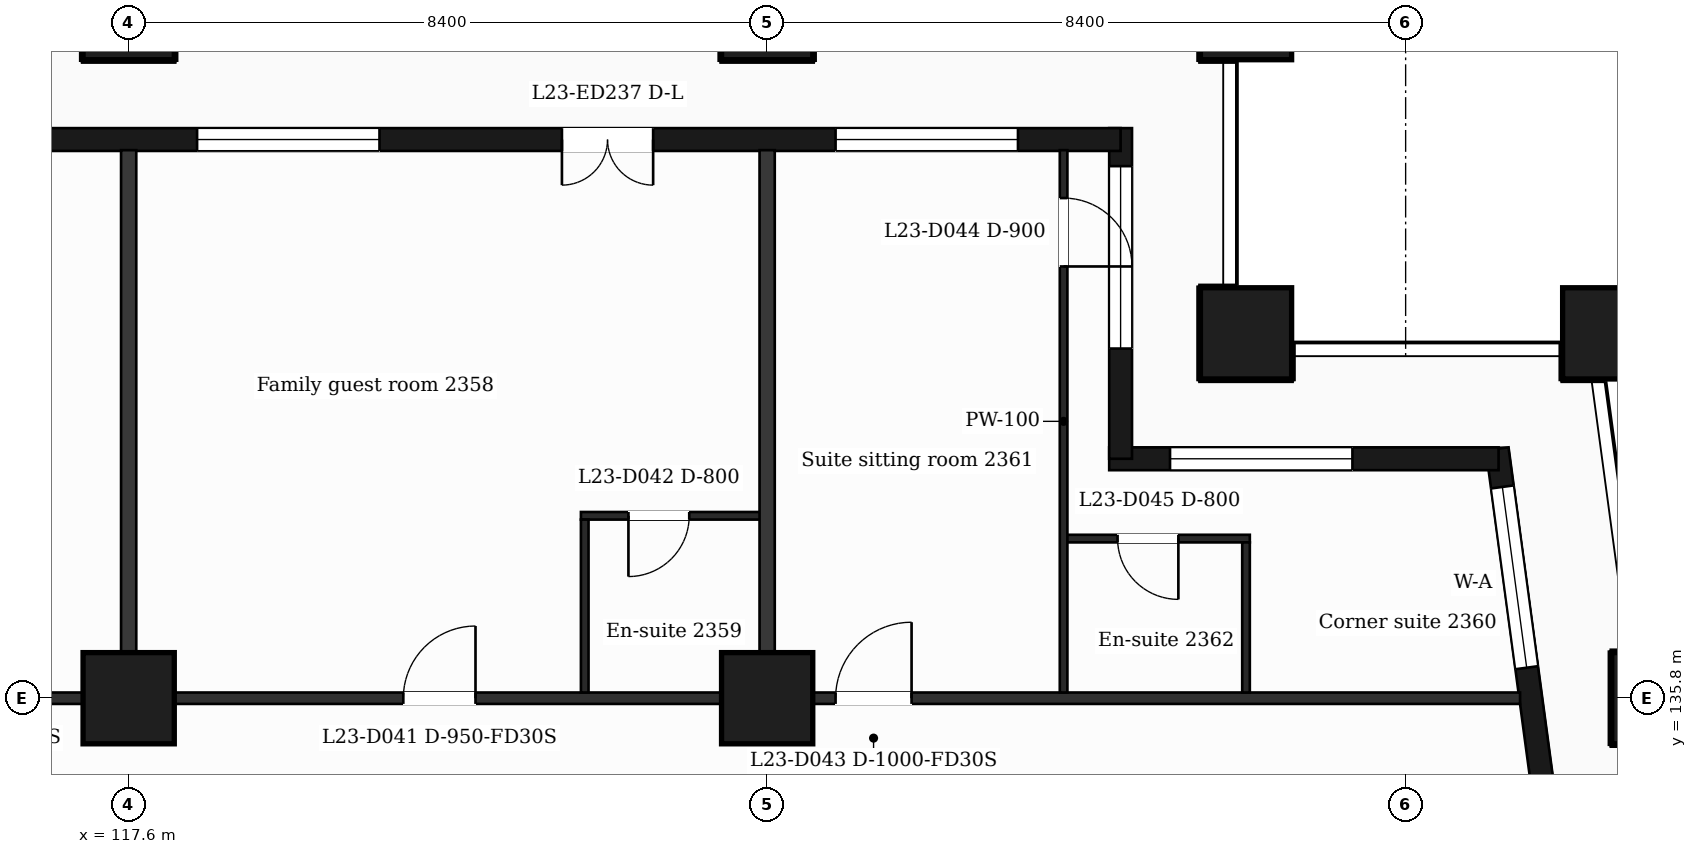
"""IFC4 building model, lengths in metres.
Left out: names, types, materials, properties, quantities, classifications, styles, units other than length and angle.
Written with IfcOpenShell. Run it as: python <this file> out.ifc"""

import sys

from ifc_helpers import new_model, si_unit, direction, frame, frame_2d, origin, origin_2d, place, context, subcontext, project, spatial, rectangle, extrude, element, fill, save


model = new_model("IFC4")
c1 = context("Model", 3, precision=1e-05, world=origin(), true_north=direction((0.0, 1.0)))
c2 = subcontext(c1, "Body", "Model", "MODEL_VIEW")
j1 = project(units=[si_unit("LENGTHUNIT", "METRE"), si_unit("PLANEANGLEUNIT", "RADIAN")], contexts=[c1])
p1 = place(None, origin())
s1 = spatial("IfcSite", under=j1, at=p1, CompositionType="ELEMENT")
p2 = place(p1, origin())
s2 = spatial("IfcBuilding", under=s1, at=p2, CompositionType="ELEMENT")
p3 = place(p2, frame((0.0, 0.0, 102.1)))
s3 = spatial("IfcBuildingStorey", under=s2, at=p3, CompositionType="ELEMENT", Elevation=102.1)
for number, where, z_axis, x_axis in (
    (1, (132.3, 140.6, 0.0), (0.0, 0.0, 1.0), (1.0, 0.0, 0.0)),
    (2, (137.065, 140.6, 0.0), (0.0, 0.0, 1.0), (1.0, 0.0, 0.0)),
    (3, (117.6, 135.8, 0.0), (0.0, 0.0, 1.0), (1.0, 0.0, 0.0)),
    (4, (126.0, 135.8, 0.0), (0.0, 0.0, 1.0), (1.0, 0.0, 0.0)),
    (5, (137.711, 135.8, 0.0), (0.0, 0.0, 1.0), (1.0, 0.0, 0.0)),
    (6, (117.6, 144.8, 0.0), (0.0, 0.0, 1.0), (1.0, 0.0, 0.0)),
    (7, (126.0, 144.8, 0.0), (0.0, 0.0, 1.0), (1.0, 0.0, 0.0)),
    (8, (132.3, 144.8, 0.0), (0.0, 0.0, 1.0), (1.0, 0.0, 0.0)),
):
    element("IfcColumn", number, at=place(p3, frame(where, z_axis=z_axis, x_axis=x_axis)), inside=s3, PredefinedType="COLUMN", context=c2, shape_type="SweptSolid", body=[
        extrude(rectangle(XDim=1.2, YDim=1.2, at=origin_2d()), origin(), (0.0, 0.0, 1.0), 3.7),
    ])
p4 = place(p3, frame((136.504, 132.4, 0.0), z_axis=(0.0, 0.0, 1.0), x_axis=(-0.133399697462, 0.99106231929, 0.0)))
e9 = element("IfcWall", 9, at=p4, inside=s3, PredefinedType="SOLIDWALL", context=c2, shape_type="SweptSolid", body=[
    extrude(rectangle(XDim=6.74, YDim=0.3, at=frame_2d((3.37, 0.0))), origin(), (0.0, 0.0, 1.0), 3.38),
])
p5 = place(p4, frame((1.115, 0.0, 0.0)))
e10 = element("IfcOpeningElement", 10, at=p5, cuts=e9, PredefinedType="OPENING", context=c2, shape_type="SweptSolid", body=[
    extrude(rectangle(XDim=1.2, YDim=2.4, at=frame_2d((0.6, 1.2))), frame((0.0, 0.16, 0.0), z_axis=(0.0, -1.0, 0.0), x_axis=(1.0, 0.0, 0.0)), (0.0, 0.0, 1.0), 0.32),
])
p6 = place(p4, frame((3.835, 0.0, 0.9)))
e11 = element("IfcOpeningElement", 11, at=p6, cuts=e9, PredefinedType="OPENING", context=c2, shape_type="SweptSolid", body=[
    extrude(rectangle(XDim=2.4, YDim=2.1, at=frame_2d((1.2, 1.05))), frame((0.0, 0.16, 0.0), z_axis=(0.0, -1.0, 0.0), x_axis=(1.0, 0.0, 0.0)), (0.0, 0.0, 1.0), 0.32),
])
p7 = place(p3, frame((135.623, 138.95, 0.0), z_axis=(0.0, 0.0, 1.0), x_axis=(-1.0, 0.0, 0.0)))
e12 = element("IfcWall", 12, at=p7, inside=s3, PredefinedType="SOLIDWALL", context=c2, shape_type="SweptSolid", body=[
    extrude(rectangle(XDim=5.123, YDim=0.3, at=frame_2d((2.561, 0.0))), origin(), (0.0, 0.0, 1.0), 3.38),
])
p8 = place(p7, frame((1.923, 0.0, 0.9)))
e13 = element("IfcOpeningElement", 13, at=p8, cuts=e12, PredefinedType="OPENING", context=c2, shape_type="SweptSolid", body=[
    extrude(rectangle(XDim=2.4, YDim=2.1, at=frame_2d((1.2, 1.05))), frame((0.0, 0.16, 0.0), z_axis=(0.0, -1.0, 0.0), x_axis=(1.0, 0.0, 0.0)), (0.0, 0.0, 1.0), 0.32),
])
p9 = place(p3, frame((130.65, 138.95, 0.0), z_axis=(0.0, 0.0, 1.0), x_axis=(0.0, 1.0, 0.0)))
e14 = element("IfcWall", 14, at=p9, inside=s3, PredefinedType="SOLIDWALL", context=c2, shape_type="SweptSolid", body=[
    extrude(rectangle(XDim=4.35, YDim=0.3, at=frame_2d((2.175, 0.0))), origin(), (0.0, 0.0, 1.0), 3.38),
])
p10 = place(p9, frame((1.45, 0.0, 0.9)))
e15 = element("IfcOpeningElement", 15, at=p10, cuts=e14, PredefinedType="OPENING", context=c2, shape_type="SweptSolid", body=[
    extrude(rectangle(XDim=2.4, YDim=2.1, at=frame_2d((1.2, 1.05))), frame((0.0, 0.16, 0.0), z_axis=(0.0, -1.0, 0.0), x_axis=(1.0, 0.0, 0.0)), (0.0, 0.0, 1.0), 0.32),
])
p11 = place(p3, frame((130.65, 143.15, 0.0), z_axis=(0.0, 0.0, 1.0), x_axis=(-1.0, 0.0, 0.0)))
e16 = element("IfcWall", 16, at=p11, inside=s3, PredefinedType="SOLIDWALL", context=c2, shape_type="SweptSolid", body=[
    extrude(rectangle(XDim=14.25, YDim=0.3, at=frame_2d((7.125, 0.0))), origin(), (0.0, 0.0, 1.0), 3.38),
])
p12 = place(p11, frame((1.35, 0.0, 0.9)))
e17 = element("IfcOpeningElement", 17, at=p12, cuts=e16, PredefinedType="OPENING", context=c2, shape_type="SweptSolid", body=[
    extrude(rectangle(XDim=2.4, YDim=2.1, at=frame_2d((1.2, 1.05))), frame((0.0, 0.16, 0.0), z_axis=(0.0, -1.0, 0.0), x_axis=(1.0, 0.0, 0.0)), (0.0, 0.0, 1.0), 0.32),
])
p13 = place(p11, frame((6.15, 0.0, 0.0)))
e18 = element("IfcOpeningElement", 18, at=p13, cuts=e16, PredefinedType="OPENING", context=c2, shape_type="SweptSolid", body=[
    extrude(rectangle(XDim=1.2, YDim=2.4, at=frame_2d((0.6, 1.2))), frame((0.0, 0.16, 0.0), z_axis=(0.0, -1.0, 0.0), x_axis=(1.0, 0.0, 0.0)), (0.0, 0.0, 1.0), 0.32),
])
p14 = place(p11, frame((9.75, 0.0, 0.9)))
e19 = element("IfcOpeningElement", 19, at=p14, cuts=e16, PredefinedType="OPENING", context=c2, shape_type="SweptSolid", body=[
    extrude(rectangle(XDim=2.4, YDim=2.1, at=frame_2d((1.2, 1.05))), frame((0.0, 0.16, 0.0), z_axis=(0.0, -1.0, 0.0), x_axis=(1.0, 0.0, 0.0)), (0.0, 0.0, 1.0), 0.32),
])
p15 = place(p3, frame((90.895, 135.8, 0.0), z_axis=(0.0, 0.0, 1.0), x_axis=(1.0, 0.0, 0.0)))
e20 = element("IfcWall", 20, at=p15, inside=s3, PredefinedType="PARTITIONING", context=c2, shape_type="SweptSolid", body=[
    extrude(rectangle(XDim=45.011, YDim=0.15, at=frame_2d((22.505, 0.0))), origin(), (0.0, 0.0, 1.0), 3.38),
])
p16 = place(p15, frame((7.455, 0.0, 0.0)))
e21 = element("IfcOpeningElement", 21, at=p16, cuts=e20, PredefinedType="OPENING", context=c2, shape_type="SweptSolid", body=[
    extrude(rectangle(XDim=1.0, YDim=2.1, at=frame_2d((0.5, 1.05))), frame((0.0, 0.085, 0.0), z_axis=(0.0, -1.0, 0.0), x_axis=(1.0, 0.0, 0.0)), (0.0, 0.0, 1.0), 0.17),
])
p17 = place(p15, frame((10.892, 0.0, 0.0)))
e22 = element("IfcOpeningElement", 22, at=p17, cuts=e20, PredefinedType="OPENING", context=c2, shape_type="SweptSolid", body=[
    extrude(rectangle(XDim=0.95, YDim=2.1, at=frame_2d((0.475, 1.05))), frame((0.0, 0.085, 0.0), z_axis=(0.0, -1.0, 0.0), x_axis=(1.0, 0.0, 0.0)), (0.0, 0.0, 1.0), 0.17),
])
p18 = place(p15, frame((23.68, 0.0, 0.0)))
e23 = element("IfcOpeningElement", 23, at=p18, cuts=e20, PredefinedType="OPENING", context=c2, shape_type="SweptSolid", body=[
    extrude(rectangle(XDim=1.0, YDim=2.1, at=frame_2d((0.5, 1.05))), frame((0.0, 0.085, 0.0), z_axis=(0.0, -1.0, 0.0), x_axis=(1.0, 0.0, 0.0)), (0.0, 0.0, 1.0), 0.17),
])
p19 = place(p15, frame((30.318, 0.0, 0.0)))
e24 = element("IfcOpeningElement", 24, at=p19, cuts=e20, PredefinedType="OPENING", context=c2, shape_type="SweptSolid", body=[
    extrude(rectangle(XDim=0.95, YDim=2.1, at=frame_2d((0.475, 1.05))), frame((0.0, 0.085, 0.0), z_axis=(0.0, -1.0, 0.0), x_axis=(1.0, 0.0, 0.0)), (0.0, 0.0, 1.0), 0.17),
])
p20 = place(p15, frame((36.005, 0.0, 0.0)))
e25 = element("IfcOpeningElement", 25, at=p20, cuts=e20, PredefinedType="OPENING", context=c2, shape_type="SweptSolid", body=[
    extrude(rectangle(XDim=1.0, YDim=2.1, at=frame_2d((0.5, 1.05))), frame((0.0, 0.085, 0.0), z_axis=(0.0, -1.0, 0.0), x_axis=(1.0, 0.0, 0.0)), (0.0, 0.0, 1.0), 0.17),
])
p21 = place(p3, frame((129.9, 137.9, 0.0), z_axis=(0.0, 0.0, 1.0), x_axis=(1.0, 0.0, 0.0)))
e26 = element("IfcWall", 26, at=p21, inside=s3, PredefinedType="PARTITIONING", context=c2, shape_type="SweptSolid", body=[
    extrude(rectangle(XDim=2.45, YDim=0.1, at=frame_2d((1.225, 0.0))), origin(), (0.0, 0.0, 1.0), 3.38),
])
p22 = place(p21, frame((0.71, 0.0, 0.0)))
e27 = element("IfcOpeningElement", 27, at=p22, cuts=e26, PredefinedType="OPENING", context=c2, shape_type="SweptSolid", body=[
    extrude(rectangle(XDim=0.8, YDim=2.1, at=frame_2d((0.4, 1.05))), frame((0.0, 0.06, 0.0), z_axis=(0.0, -1.0, 0.0), x_axis=(1.0, 0.0, 0.0)), (0.0, 0.0, 1.0), 0.12),
])
p23 = place(p3, frame((123.55, 138.2, 0.0), z_axis=(0.0, 0.0, 1.0), x_axis=(1.0, 0.0, 0.0)))
e28 = element("IfcWall", 28, at=p23, inside=s3, PredefinedType="PARTITIONING", context=c2, shape_type="SweptSolid", body=[
    extrude(rectangle(XDim=2.45, YDim=0.1, at=frame_2d((1.225, 0.0))), origin(), (0.0, 0.0, 1.0), 3.38),
])
p24 = place(p23, frame((0.625, 0.0, 0.0)))
e29 = element("IfcOpeningElement", 29, at=p24, cuts=e28, PredefinedType="OPENING", context=c2, shape_type="SweptSolid", body=[
    extrude(rectangle(XDim=0.8, YDim=2.1, at=frame_2d((0.4, 1.05))), frame((0.0, 0.06, 0.0), z_axis=(0.0, -1.0, 0.0), x_axis=(1.0, 0.0, 0.0)), (0.0, 0.0, 1.0), 0.12),
])
p25 = place(p3, frame((117.6, 135.875, 0.0), z_axis=(0.0, 0.0, 1.0), x_axis=(0.0, 1.0, 0.0)))
e30 = element("IfcWall", 30, at=p25, inside=s3, PredefinedType="PARTITIONING", context=c2, shape_type="SweptSolid", body=[
    extrude(rectangle(XDim=7.135, YDim=0.2, at=frame_2d((3.567, 0.0))), origin(), (0.0, 0.0, 1.0), 3.38),
])
p26 = place(p3, frame((123.6, 135.875, 0.0), z_axis=(0.0, 0.0, 1.0), x_axis=(0.0, 1.0, 0.0)))
e31 = element("IfcWall", 31, at=p26, inside=s3, PredefinedType="PARTITIONING", context=c2, shape_type="SweptSolid", body=[
    extrude(rectangle(XDim=2.275, YDim=0.1, at=frame_2d((1.137, 0.0))), origin(), (0.0, 0.0, 1.0), 3.38),
])
p27 = place(p3, frame((126.0, 135.875, 0.0), z_axis=(0.0, 0.0, 1.0), x_axis=(0.0, 1.0, 0.0)))
e32 = element("IfcWall", 32, at=p27, inside=s3, PredefinedType="PARTITIONING", context=c2, shape_type="SweptSolid", body=[
    extrude(rectangle(XDim=7.135, YDim=0.2, at=frame_2d((3.567, 0.0))), origin(), (0.0, 0.0, 1.0), 3.38),
])
p28 = place(p3, frame((129.9, 135.875, 0.0), z_axis=(0.0, 0.0, 1.0), x_axis=(0.0, 1.0, 0.0)))
e33 = element("IfcWall", 33, at=p28, inside=s3, PredefinedType="PARTITIONING", context=c2, shape_type="SweptSolid", body=[
    extrude(rectangle(XDim=7.135, YDim=0.1, at=frame_2d((3.567, 0.0))), origin(), (0.0, 0.0, 1.0), 3.38),
])
p29 = place(p28, frame((5.605, 0.0, 0.0)))
e34 = element("IfcOpeningElement", 34, at=p29, cuts=e33, PredefinedType="OPENING", context=c2, shape_type="SweptSolid", body=[
    extrude(rectangle(XDim=0.9, YDim=2.1, at=frame_2d((0.45, 1.05))), frame((0.0, 0.06, 0.0), z_axis=(0.0, -1.0, 0.0), x_axis=(1.0, 0.0, 0.0)), (0.0, 0.0, 1.0), 0.12),
])
p30 = place(p3, frame((132.3, 135.875, 0.0), z_axis=(0.0, 0.0, 1.0), x_axis=(0.0, 1.0, 0.0)))
e35 = element("IfcWall", 35, at=p30, inside=s3, PredefinedType="PARTITIONING", context=c2, shape_type="SweptSolid", body=[
    extrude(rectangle(XDim=1.975, YDim=0.1, at=frame_2d((0.988, 0.0))), origin(), (0.0, 0.0, 1.0), 3.38),
])
p31 = place(p6, origin())
e36 = element("IfcWindow", 36, at=p31, inside=s3, PartitioningType="SINGLE_PANEL", PredefinedType="WINDOW", context=c2, shape_type="SweptSolid", body=[
    extrude(rectangle(XDim=2.4, YDim=2.1, at=frame_2d((1.2, 1.05))), frame((0.0, 0.03, 0.0), z_axis=(0.0, -1.0, 0.0), x_axis=(1.0, 0.0, 0.0)), (0.0, 0.0, 1.0), 0.06),
])
fill(e11, e36)
p32 = place(p8, origin())
e37 = element("IfcWindow", 37, at=p32, inside=s3, PartitioningType="SINGLE_PANEL", PredefinedType="WINDOW", context=c2, shape_type="SweptSolid", body=[
    extrude(rectangle(XDim=2.4, YDim=2.1, at=frame_2d((1.2, 1.05))), frame((0.0, 0.03, 0.0), z_axis=(0.0, -1.0, 0.0), x_axis=(1.0, 0.0, 0.0)), (0.0, 0.0, 1.0), 0.06),
])
fill(e13, e37)
p33 = place(p10, origin())
e38 = element("IfcWindow", 38, at=p33, inside=s3, PartitioningType="SINGLE_PANEL", PredefinedType="WINDOW", context=c2, shape_type="SweptSolid", body=[
    extrude(rectangle(XDim=2.4, YDim=2.1, at=frame_2d((1.2, 1.05))), frame((0.0, 0.03, 0.0), z_axis=(0.0, -1.0, 0.0), x_axis=(1.0, 0.0, 0.0)), (0.0, 0.0, 1.0), 0.06),
])
fill(e15, e38)
p34 = place(p12, origin())
e39 = element("IfcWindow", 39, at=p34, inside=s3, PartitioningType="SINGLE_PANEL", PredefinedType="WINDOW", context=c2, shape_type="SweptSolid", body=[
    extrude(rectangle(XDim=2.4, YDim=2.1, at=frame_2d((1.2, 1.05))), frame((0.0, 0.03, 0.0), z_axis=(0.0, -1.0, 0.0), x_axis=(1.0, 0.0, 0.0)), (0.0, 0.0, 1.0), 0.06),
])
fill(e17, e39)
p35 = place(p13, origin())
e40 = element("IfcDoor", 40, at=p35, inside=s3, OperationType="DOUBLE_DOOR_SINGLE_SWING", PredefinedType="DOOR", context=c2, shape_type="SweptSolid", body=[
    extrude(rectangle(XDim=1.2, YDim=2.4, at=frame_2d((0.6, 1.2))), frame((0.0, 0.025, 0.0), z_axis=(0.0, -1.0, 0.0), x_axis=(1.0, 0.0, 0.0)), (0.0, 0.0, 1.0), 0.05),
])
fill(e18, e40)
p36 = place(p14, origin())
e41 = element("IfcWindow", 41, at=p36, inside=s3, PartitioningType="SINGLE_PANEL", PredefinedType="WINDOW", context=c2, shape_type="SweptSolid", body=[
    extrude(rectangle(XDim=2.4, YDim=2.1, at=frame_2d((1.2, 1.05))), frame((0.0, 0.03, 0.0), z_axis=(0.0, -1.0, 0.0), x_axis=(1.0, 0.0, 0.0)), (0.0, 0.0, 1.0), 0.06),
])
fill(e19, e41)
p37 = place(p19, origin())
e42 = element("IfcDoor", 42, at=p37, inside=s3, OperationType="SINGLE_SWING_RIGHT", PredefinedType="DOOR", context=c2, shape_type="SweptSolid", body=[
    extrude(rectangle(XDim=0.95, YDim=2.1, at=frame_2d((0.475, 1.05))), frame((0.0, 0.025, 0.0), z_axis=(0.0, -1.0, 0.0), x_axis=(1.0, 0.0, 0.0)), (0.0, 0.0, 1.0), 0.05),
])
fill(e24, e42)
p38 = place(p24, origin())
e43 = element("IfcDoor", 43, at=p38, inside=s3, OperationType="SINGLE_SWING_LEFT", PredefinedType="DOOR", context=c2, shape_type="SweptSolid", body=[
    extrude(rectangle(XDim=0.8, YDim=2.1, at=frame_2d((0.4, 1.05))), frame((0.0, 0.025, 0.0), z_axis=(0.0, -1.0, 0.0), x_axis=(1.0, 0.0, 0.0)), (0.0, 0.0, 1.0), 0.05),
])
fill(e29, e43)
p39 = place(p20, origin())
e44 = element("IfcDoor", 44, at=p39, inside=s3, OperationType="SINGLE_SWING_RIGHT", PredefinedType="DOOR", context=c2, shape_type="SweptSolid", body=[
    extrude(rectangle(XDim=1.0, YDim=2.1, at=frame_2d((0.5, 1.05))), frame((0.0, 0.025, 0.0), z_axis=(0.0, -1.0, 0.0), x_axis=(1.0, 0.0, 0.0)), (0.0, 0.0, 1.0), 0.05),
])
fill(e25, e44)
p40 = place(p29, origin())
e45 = element("IfcDoor", 45, at=p40, inside=s3, OperationType="SINGLE_SWING_LEFT", PredefinedType="DOOR", context=c2, shape_type="SweptSolid", body=[
    extrude(rectangle(XDim=0.9, YDim=2.1, at=frame_2d((0.45, 1.05))), frame((0.0, 0.025, 0.0), z_axis=(0.0, -1.0, 0.0), x_axis=(1.0, 0.0, 0.0)), (0.0, 0.0, 1.0), 0.05),
])
fill(e34, e45)
p41 = place(p22, origin())
e46 = element("IfcDoor", 46, at=p41, inside=s3, OperationType="SINGLE_SWING_RIGHT", PredefinedType="DOOR", context=c2, shape_type="SweptSolid", body=[
    extrude(rectangle(XDim=0.8, YDim=2.1, at=frame_2d((0.4, 1.05))), frame((0.0, 0.025, 0.0), z_axis=(0.0, -1.0, 0.0), x_axis=(1.0, 0.0, 0.0)), (0.0, 0.0, 1.0), 0.05),
])
fill(e27, e46)
save(model, sys.argv[1])
